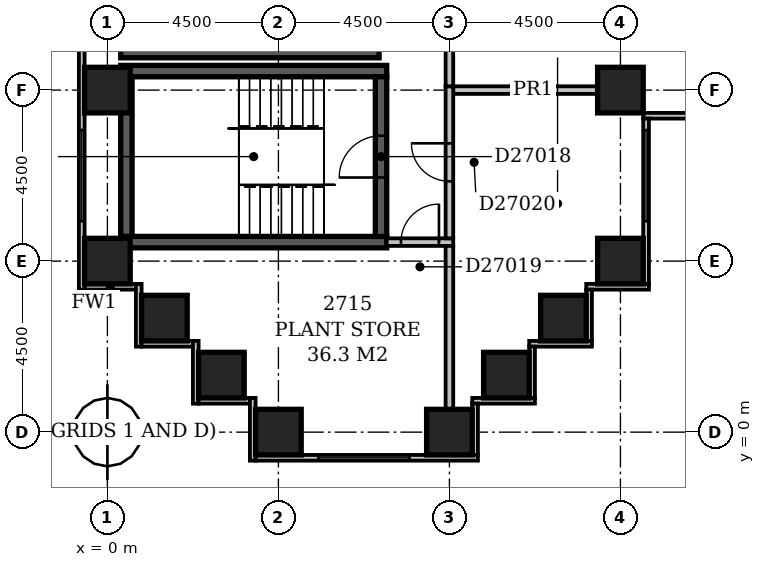
"""IFC4 building model, lengths in metres.
Left out: names, types, materials, properties, quantities, classifications, styles, units other than length and angle.
Written with IfcOpenShell. Run it as: python <this file> out.ifc"""

import sys

from ifc_helpers import new_model, si_unit, direction, frame, frame_2d, origin, origin_2d, place, context, subcontext, project, spatial, rectangle, extrude, element, fill, save


model = new_model("IFC4")
c1 = context("Model", 3, precision=1e-05, world=origin(), true_north=direction((0.0, 1.0)))
c2 = subcontext(c1, "Body", "Model", "MODEL_VIEW")
j1 = project(units=[si_unit("LENGTHUNIT", "METRE"), si_unit("PLANEANGLEUNIT", "RADIAN")], contexts=[c1])
p1 = place(None, origin())
s1 = spatial("IfcSite", under=j1, at=p1, CompositionType="ELEMENT")
p2 = place(p1, origin())
s2 = spatial("IfcBuilding", under=s1, at=p2, CompositionType="ELEMENT")
p3 = place(p2, frame((0.0, 0.0, 108.2)))
s3 = spatial("IfcBuildingStorey", under=s2, at=p3, CompositionType="ELEMENT", Elevation=108.2)
for number, where, z_axis, x_axis in (
    (1, (0.35, 5.0, -0.45), (0.0, 0.0, 1.0), (1.0, 0.0, 0.0)),
    (2, (0.35, 9.5, -0.45), (0.0, 0.0, 1.0), (1.0, 0.0, 0.0)),
):
    element("IfcWall", number, at=place(p3, frame(where, z_axis=z_axis, x_axis=x_axis)), inside=s3, PredefinedType="SHEAR", context=c2, shape_type="SweptSolid", body=[
        extrude(rectangle(XDim=7.0, YDim=0.3, at=frame_2d((3.5, 0.0))), origin(), (0.0, 0.0, 1.0), 5.35),
    ])
p4 = place(p3, frame((0.35, 10.0, -0.45), z_axis=(0.0, 0.0, 1.0), x_axis=(1.0, 0.0, 0.0)))
e3 = element("IfcWall", 3, at=p4, inside=s3, PredefinedType="SHEAR", context=c2, shape_type="SweptSolid", body=[
    extrude(rectangle(XDim=6.8, YDim=0.3, at=frame_2d((3.4, 0.0))), origin(), (0.0, 0.0, 1.0), 5.35),
])
p5 = place(p3, frame((0.5, 5.15, -0.45), z_axis=(0.0, 0.0, 1.0), x_axis=(0.0, 1.0, 0.0)))
e4 = element("IfcWall", 4, at=p5, inside=s3, PredefinedType="SHEAR", context=c2, shape_type="SweptSolid", body=[
    extrude(rectangle(XDim=4.2, YDim=0.3, at=frame_2d((2.1, 0.0))), origin(), (0.0, 0.0, 1.0), 5.35),
])
p6 = place(p3, frame((7.2, 5.15, -0.45), z_axis=(0.0, 0.0, 1.0), x_axis=(0.0, 1.0, 0.0)))
e5 = element("IfcWall", 5, at=p6, inside=s3, PredefinedType="SHEAR", context=c2, shape_type="SweptSolid", body=[
    extrude(rectangle(XDim=4.2, YDim=0.3, at=frame_2d((2.1, 0.0))), origin(), (0.0, 0.0, 1.0), 5.35),
])
p7 = place(p6, frame((1.55, 0.0, 0.45)))
e6 = element("IfcOpeningElement", 6, at=p7, cuts=e5, PredefinedType="OPENING", context=c2, shape_type="SweptSolid", body=[
    extrude(rectangle(XDim=1.1, YDim=2.1, at=frame_2d((0.55, 1.05))), frame((0.0, 0.162, 0.0), z_axis=(0.0, -1.0, 0.0), x_axis=(1.0, 0.0, 0.0)), (0.0, 0.0, 1.0), 0.324),
])
for number, where, z_axis, x_axis in (
    (7, (4.5, 0.0, -0.45), (0.0, 0.0, 1.0), (1.0, 0.0, 0.0)),
    (8, (9.0, 0.0, -0.45), (0.0, 0.0, 1.0), (1.0, 0.0, 0.0)),
    (9, (3.0, 1.5, -0.45), (0.0, 0.0, 1.0), (1.0, 0.0, 0.0)),
    (10, (10.5, 1.5, -0.45), (0.0, 0.0, 1.0), (1.0, 0.0, 0.0)),
    (11, (1.5, 3.0, -0.45), (0.0, 0.0, 1.0), (1.0, 0.0, 0.0)),
    (12, (12.0, 3.0, -0.45), (0.0, 0.0, 1.0), (1.0, 0.0, 0.0)),
    (13, (0.0, 4.5, -0.45), (0.0, 0.0, 1.0), (1.0, 0.0, 0.0)),
    (14, (13.5, 4.5, -0.45), (0.0, 0.0, 1.0), (1.0, 0.0, 0.0)),
    (15, (0.0, 9.0, -0.45), (0.0, 0.0, 1.0), (1.0, 0.0, 0.0)),
    (16, (13.5, 9.0, -0.45), (0.0, 0.0, 1.0), (1.0, 0.0, 0.0)),
):
    element("IfcColumn", number, at=place(p3, frame(where, z_axis=z_axis, x_axis=x_axis)), inside=s3, PredefinedType="COLUMN", context=c2, shape_type="SweptSolid", body=[
        extrude(rectangle(XDim=1.2, YDim=1.2, at=origin_2d()), origin(), (0.0, 0.0, 1.0), 5.35),
    ])
p8 = place(p3, frame((9.675, -0.6, 0.0), z_axis=(0.0, 0.0, 1.0), x_axis=(0.0, 1.0, 0.0)))
e17 = element("IfcWall", 17, at=p8, inside=s3, PredefinedType="STANDARD", context=c2, shape_type="SweptSolid", body=[
    extrude(rectangle(XDim=1.35, YDim=0.15, at=frame_2d((0.675, 0.0))), origin(), (0.0, 0.0, 1.0), 4.3),
])
p9 = place(p3, frame((9.6, 0.825, 0.0), z_axis=(0.0, 0.0, 1.0), x_axis=(1.0, 0.0, 0.0)))
e18 = element("IfcWall", 18, at=p9, inside=s3, PredefinedType="STANDARD", context=c2, shape_type="SweptSolid", body=[
    extrude(rectangle(XDim=1.65, YDim=0.15, at=frame_2d((0.825, 0.0))), origin(), (0.0, 0.0, 1.0), 4.3),
])
p10 = place(p3, frame((11.175, 0.9, 0.0), z_axis=(0.0, 0.0, 1.0), x_axis=(0.0, 1.0, 0.0)))
e19 = element("IfcWall", 19, at=p10, inside=s3, PredefinedType="STANDARD", context=c2, shape_type="SweptSolid", body=[
    extrude(rectangle(XDim=1.35, YDim=0.15, at=frame_2d((0.675, 0.0))), origin(), (0.0, 0.0, 1.0), 4.3),
])
p11 = place(p3, frame((11.1, 2.325, 0.0), z_axis=(0.0, 0.0, 1.0), x_axis=(1.0, 0.0, 0.0)))
e20 = element("IfcWall", 20, at=p11, inside=s3, PredefinedType="STANDARD", context=c2, shape_type="SweptSolid", body=[
    extrude(rectangle(XDim=1.65, YDim=0.15, at=frame_2d((0.825, 0.0))), origin(), (0.0, 0.0, 1.0), 4.3),
])
p12 = place(p3, frame((12.675, 2.4, 0.0), z_axis=(0.0, 0.0, 1.0), x_axis=(0.0, 1.0, 0.0)))
e21 = element("IfcWall", 21, at=p12, inside=s3, PredefinedType="STANDARD", context=c2, shape_type="SweptSolid", body=[
    extrude(rectangle(XDim=1.35, YDim=0.15, at=frame_2d((0.675, 0.0))), origin(), (0.0, 0.0, 1.0), 4.3),
])
p13 = place(p3, frame((12.6, 3.825, 0.0), z_axis=(0.0, 0.0, 1.0), x_axis=(1.0, 0.0, 0.0)))
e22 = element("IfcWall", 22, at=p13, inside=s3, PredefinedType="STANDARD", context=c2, shape_type="SweptSolid", body=[
    extrude(rectangle(XDim=1.65, YDim=0.15, at=frame_2d((0.825, 0.0))), origin(), (0.0, 0.0, 1.0), 4.3),
])
p14 = place(p3, frame((14.175, 3.9, 0.0), z_axis=(0.0, 0.0, 1.0), x_axis=(0.0, 1.0, 0.0)))
e23 = element("IfcWall", 23, at=p14, inside=s3, PredefinedType="STANDARD", context=c2, shape_type="SweptSolid", body=[
    extrude(rectangle(XDim=4.35, YDim=0.15, at=frame_2d((2.175, 0.0))), origin(), (0.0, 0.0, 1.0), 4.3),
])
p15 = place(p14, frame((1.65, 0.0, 0.6)))
e24 = element("IfcOpeningElement", 24, at=p15, cuts=e23, PredefinedType="OPENING", context=c2, shape_type="SweptSolid", body=[
    extrude(rectangle(XDim=2.4, YDim=2.4, at=frame_2d((1.2, 1.2))), frame((0.0, 0.087, 0.0), z_axis=(0.0, -1.0, 0.0), x_axis=(1.0, 0.0, 0.0)), (0.0, 0.0, 1.0), 0.174),
])
p16 = place(p3, frame((14.1, 8.325, 0.0), z_axis=(0.0, 0.0, 1.0), x_axis=(1.0, 0.0, 0.0)))
e25 = element("IfcWall", 25, at=p16, inside=s3, PredefinedType="STANDARD", context=c2, shape_type="SweptSolid", body=[
    extrude(rectangle(XDim=4.65, YDim=0.15, at=frame_2d((2.325, 0.0))), origin(), (0.0, 0.0, 1.0), 4.3),
])
p17 = place(p3, frame((-0.675, 59.1, 0.0), z_axis=(0.0, 0.0, 1.0), x_axis=(0.0, -1.0, 0.0)))
e26 = element("IfcWall", 26, at=p17, inside=s3, PredefinedType="STANDARD", context=c2, shape_type="SweptSolid", body=[
    extrude(rectangle(XDim=55.35, YDim=0.15, at=frame_2d((27.675, 0.0))), origin(), (0.0, 0.0, 1.0), 4.3),
])
p18 = place(p17, frame((5.95, 0.0, 0.6)))
e27 = element("IfcOpeningElement", 27, at=p18, cuts=e26, PredefinedType="OPENING", context=c2, shape_type="SweptSolid", body=[
    extrude(rectangle(XDim=2.4, YDim=2.4, at=frame_2d((1.2, 1.2))), frame((0.0, 0.087, 0.0), z_axis=(0.0, -1.0, 0.0), x_axis=(1.0, 0.0, 0.0)), (0.0, 0.0, 1.0), 0.174),
])
p19 = place(p17, frame((15.15, 0.0, 0.6)))
e28 = element("IfcOpeningElement", 28, at=p19, cuts=e26, PredefinedType="OPENING", context=c2, shape_type="SweptSolid", body=[
    extrude(rectangle(XDim=2.4, YDim=2.4, at=frame_2d((1.2, 1.2))), frame((0.0, 0.087, 0.0), z_axis=(0.0, -1.0, 0.0), x_axis=(1.0, 0.0, 0.0)), (0.0, 0.0, 1.0), 0.174),
])
p20 = place(p17, frame((24.15, 0.0, 0.6)))
e29 = element("IfcOpeningElement", 29, at=p20, cuts=e26, PredefinedType="OPENING", context=c2, shape_type="SweptSolid", body=[
    extrude(rectangle(XDim=2.4, YDim=2.4, at=frame_2d((1.2, 1.2))), frame((0.0, 0.087, 0.0), z_axis=(0.0, -1.0, 0.0), x_axis=(1.0, 0.0, 0.0)), (0.0, 0.0, 1.0), 0.174),
])
p21 = place(p17, frame((32.95, 0.0, 0.6)))
e30 = element("IfcOpeningElement", 30, at=p21, cuts=e26, PredefinedType="OPENING", context=c2, shape_type="SweptSolid", body=[
    extrude(rectangle(XDim=2.4, YDim=2.4, at=frame_2d((1.2, 1.2))), frame((0.0, 0.087, 0.0), z_axis=(0.0, -1.0, 0.0), x_axis=(1.0, 0.0, 0.0)), (0.0, 0.0, 1.0), 0.174),
])
p22 = place(p17, frame((42.15, 0.0, 0.6)))
e31 = element("IfcOpeningElement", 31, at=p22, cuts=e26, PredefinedType="OPENING", context=c2, shape_type="SweptSolid", body=[
    extrude(rectangle(XDim=2.4, YDim=2.4, at=frame_2d((1.2, 1.2))), frame((0.0, 0.087, 0.0), z_axis=(0.0, -1.0, 0.0), x_axis=(1.0, 0.0, 0.0)), (0.0, 0.0, 1.0), 0.174),
])
p23 = place(p17, frame((51.15, 0.0, 0.6)))
e32 = element("IfcOpeningElement", 32, at=p23, cuts=e26, PredefinedType="OPENING", context=c2, shape_type="SweptSolid", body=[
    extrude(rectangle(XDim=2.4, YDim=2.4, at=frame_2d((1.2, 1.2))), frame((0.0, 0.087, 0.0), z_axis=(0.0, -1.0, 0.0), x_axis=(1.0, 0.0, 0.0)), (0.0, 0.0, 1.0), 0.174),
])
p24 = place(p3, frame((-0.6, 3.825, 0.0), z_axis=(0.0, 0.0, 1.0), x_axis=(1.0, 0.0, 0.0)))
e33 = element("IfcWall", 33, at=p24, inside=s3, PredefinedType="STANDARD", context=c2, shape_type="SweptSolid", body=[
    extrude(rectangle(XDim=1.35, YDim=0.15, at=frame_2d((0.675, 0.0))), origin(), (0.0, 0.0, 1.0), 4.3),
])
p25 = place(p3, frame((0.825, 3.9, 0.0), z_axis=(0.0, 0.0, 1.0), x_axis=(0.0, -1.0, 0.0)))
e34 = element("IfcWall", 34, at=p25, inside=s3, PredefinedType="STANDARD", context=c2, shape_type="SweptSolid", body=[
    extrude(rectangle(XDim=1.65, YDim=0.15, at=frame_2d((0.825, 0.0))), origin(), (0.0, 0.0, 1.0), 4.3),
])
p26 = place(p3, frame((0.9, 2.325, 0.0), z_axis=(0.0, 0.0, 1.0), x_axis=(1.0, 0.0, 0.0)))
e35 = element("IfcWall", 35, at=p26, inside=s3, PredefinedType="STANDARD", context=c2, shape_type="SweptSolid", body=[
    extrude(rectangle(XDim=1.35, YDim=0.15, at=frame_2d((0.675, 0.0))), origin(), (0.0, 0.0, 1.0), 4.3),
])
p27 = place(p3, frame((2.325, 2.4, 0.0), z_axis=(0.0, 0.0, 1.0), x_axis=(0.0, -1.0, 0.0)))
e36 = element("IfcWall", 36, at=p27, inside=s3, PredefinedType="STANDARD", context=c2, shape_type="SweptSolid", body=[
    extrude(rectangle(XDim=1.65, YDim=0.15, at=frame_2d((0.825, 0.0))), origin(), (0.0, 0.0, 1.0), 4.3),
])
p28 = place(p3, frame((2.4, 0.825, 0.0), z_axis=(0.0, 0.0, 1.0), x_axis=(1.0, 0.0, 0.0)))
e37 = element("IfcWall", 37, at=p28, inside=s3, PredefinedType="STANDARD", context=c2, shape_type="SweptSolid", body=[
    extrude(rectangle(XDim=1.35, YDim=0.15, at=frame_2d((0.675, 0.0))), origin(), (0.0, 0.0, 1.0), 4.3),
])
p29 = place(p3, frame((3.825, 0.9, 0.0), z_axis=(0.0, 0.0, 1.0), x_axis=(0.0, -1.0, 0.0)))
e38 = element("IfcWall", 38, at=p29, inside=s3, PredefinedType="STANDARD", context=c2, shape_type="SweptSolid", body=[
    extrude(rectangle(XDim=1.65, YDim=0.15, at=frame_2d((0.825, 0.0))), origin(), (0.0, 0.0, 1.0), 4.3),
])
p30 = place(p3, frame((3.9, -0.675, 0.0), z_axis=(0.0, 0.0, 1.0), x_axis=(1.0, 0.0, 0.0)))
e39 = element("IfcWall", 39, at=p30, inside=s3, PredefinedType="STANDARD", context=c2, shape_type="SweptSolid", body=[
    extrude(rectangle(XDim=5.85, YDim=0.15, at=frame_2d((2.925, 0.0))), origin(), (0.0, 0.0, 1.0), 4.3),
])
p31 = place(p30, frame((1.65, 0.0, 0.6)))
e40 = element("IfcOpeningElement", 40, at=p31, cuts=e39, PredefinedType="OPENING", context=c2, shape_type="SweptSolid", body=[
    extrude(rectangle(XDim=2.4, YDim=2.4, at=frame_2d((1.2, 1.2))), frame((0.0, 0.087, 0.0), z_axis=(0.0, -1.0, 0.0), x_axis=(1.0, 0.0, 0.0)), (0.0, 0.0, 1.0), 0.174),
])
p32 = place(p3, frame((9.0, 0.271, 0.0), z_axis=(0.0, 0.0, 1.0), x_axis=(0.0, 1.0, 0.0)))
e41 = element("IfcWall", 41, at=p32, inside=s3, PredefinedType="PARTITIONING", context=c2, shape_type="SweptSolid", body=[
    extrude(rectangle(XDim=4.629, YDim=0.2, at=frame_2d((2.314, 0.0))), origin(), (0.0, 0.0, 1.0), 4.9),
])
p33 = place(p3, frame((7.35, 5.0, 0.0), z_axis=(0.0, 0.0, 1.0), x_axis=(1.0, 0.0, 0.0)))
e42 = element("IfcWall", 42, at=p33, inside=s3, PredefinedType="PARTITIONING", context=c2, shape_type="SweptSolid", body=[
    extrude(rectangle(XDim=1.75, YDim=0.2, at=frame_2d((0.875, 0.0))), origin(), (0.0, 0.0, 1.0), 4.9),
])
p34 = place(p33, frame((0.375, 0.0, 0.0)))
e43 = element("IfcOpeningElement", 43, at=p34, cuts=e42, PredefinedType="OPENING", context=c2, shape_type="SweptSolid", body=[
    extrude(rectangle(XDim=1.0, YDim=2.1, at=frame_2d((0.5, 1.05))), frame((0.0, 0.112, 0.0), z_axis=(0.0, -1.0, 0.0), x_axis=(1.0, 0.0, 0.0)), (0.0, 0.0, 1.0), 0.224),
])
p35 = place(p3, frame((9.0, 5.1, 0.0), z_axis=(0.0, 0.0, 1.0), x_axis=(0.0, 1.0, 0.0)))
e44 = element("IfcWall", 44, at=p35, inside=s3, PredefinedType="PARTITIONING", context=c2, shape_type="SweptSolid", body=[
    extrude(rectangle(XDim=4.0, YDim=0.2, at=frame_2d((2.0, 0.0))), origin(), (0.0, 0.0, 1.0), 4.9),
])
p36 = place(p35, frame((1.5, 0.0, 0.0)))
e45 = element("IfcOpeningElement", 45, at=p36, cuts=e44, PredefinedType="OPENING", context=c2, shape_type="SweptSolid", body=[
    extrude(rectangle(XDim=1.0, YDim=2.1, at=frame_2d((0.5, 1.05))), frame((0.0, 0.112, 0.0), z_axis=(0.0, -1.0, 0.0), x_axis=(1.0, 0.0, 0.0)), (0.0, 0.0, 1.0), 0.224),
])
p37 = place(p3, frame((9.0, 9.1, 0.0), z_axis=(0.0, 0.0, 1.0), x_axis=(0.0, 1.0, 0.0)))
e46 = element("IfcWall", 46, at=p37, inside=s3, PredefinedType="PARTITIONING", context=c2, shape_type="SweptSolid", body=[
    extrude(rectangle(XDim=8.8, YDim=0.2, at=frame_2d((4.4, 0.0))), origin(), (0.0, 0.0, 1.0), 4.9),
])
p38 = place(p37, frame((3.8, 0.0, 0.0)))
e47 = element("IfcOpeningElement", 47, at=p38, cuts=e46, PredefinedType="OPENING", context=c2, shape_type="SweptSolid", body=[
    extrude(rectangle(XDim=1.2, YDim=2.1, at=frame_2d((0.6, 1.05))), frame((0.0, 0.112, 0.0), z_axis=(0.0, -1.0, 0.0), x_axis=(1.0, 0.0, 0.0)), (0.0, 0.0, 1.0), 0.224),
])
p39 = place(p3, frame((13.309, 9.0, 0.0), z_axis=(0.0, 0.0, 1.0), x_axis=(-1.0, 0.0, 0.0)))
e48 = element("IfcWall", 48, at=p39, inside=s3, PredefinedType="PARTITIONING", context=c2, shape_type="SweptSolid", body=[
    extrude(rectangle(XDim=4.208, YDim=0.2, at=frame_2d((2.104, 0.0))), origin(), (0.0, 0.0, 1.0), 4.9),
])
p40 = place(p15, origin())
e49 = element("IfcWindow", 49, at=p40, inside=s3, PartitioningType="SINGLE_PANEL", PredefinedType="USERDEFINED", context=c2, shape_type="SweptSolid", body=[
    extrude(rectangle(XDim=2.4, YDim=2.4, at=frame_2d((1.2, 1.2))), frame((0.0, 0.03, 0.0), z_axis=(0.0, -1.0, 0.0), x_axis=(1.0, 0.0, 0.0)), (0.0, 0.0, 1.0), 0.06),
])
fill(e24, e49)
p41 = place(p23, origin())
e50 = element("IfcWindow", 50, at=p41, inside=s3, PartitioningType="SINGLE_PANEL", PredefinedType="USERDEFINED", context=c2, shape_type="SweptSolid", body=[
    extrude(rectangle(XDim=2.4, YDim=2.4, at=frame_2d((1.2, 1.2))), frame((0.0, 0.03, 0.0), z_axis=(0.0, -1.0, 0.0), x_axis=(1.0, 0.0, 0.0)), (0.0, 0.0, 1.0), 0.06),
])
fill(e32, e50)
p42 = place(p31, origin())
e51 = element("IfcWindow", 51, at=p42, inside=s3, PartitioningType="SINGLE_PANEL", PredefinedType="USERDEFINED", context=c2, shape_type="SweptSolid", body=[
    extrude(rectangle(XDim=2.4, YDim=2.4, at=frame_2d((1.2, 1.2))), frame((0.0, 0.03, 0.0), z_axis=(0.0, -1.0, 0.0), x_axis=(1.0, 0.0, 0.0)), (0.0, 0.0, 1.0), 0.06),
])
fill(e40, e51)
p43 = place(p7, origin())
e52 = element("IfcDoor", 52, at=p43, inside=s3, OperationType="SINGLE_SWING_LEFT", PredefinedType="DOOR", context=c2, shape_type="SweptSolid", body=[
    extrude(rectangle(XDim=1.1, YDim=2.1, at=frame_2d((0.55, 1.05))), frame((0.0, 0.025, 0.0), z_axis=(0.0, -1.0, 0.0), x_axis=(1.0, 0.0, 0.0)), (0.0, 0.0, 1.0), 0.05),
])
fill(e6, e52)
p44 = place(p34, frame((1.0, 0.0, 0.0), z_axis=(0.0, 0.0, 1.0), x_axis=(-1.0, 0.0, 0.0)))
e53 = element("IfcDoor", 53, at=p44, inside=s3, OperationType="SINGLE_SWING_LEFT", PredefinedType="DOOR", context=c2, shape_type="SweptSolid", body=[
    extrude(rectangle(XDim=1.0, YDim=2.1, at=frame_2d((0.5, 1.05))), frame((0.0, 0.025, 0.0), z_axis=(0.0, -1.0, 0.0), x_axis=(1.0, 0.0, 0.0)), (0.0, 0.0, 1.0), 0.05),
])
fill(e43, e53)
p45 = place(p36, frame((1.0, 0.0, 0.0), z_axis=(0.0, 0.0, 1.0), x_axis=(-1.0, 0.0, 0.0)))
e54 = element("IfcDoor", 54, at=p45, inside=s3, OperationType="SINGLE_SWING_LEFT", PredefinedType="DOOR", context=c2, shape_type="SweptSolid", body=[
    extrude(rectangle(XDim=1.0, YDim=2.1, at=frame_2d((0.5, 1.05))), frame((0.0, 0.025, 0.0), z_axis=(0.0, -1.0, 0.0), x_axis=(1.0, 0.0, 0.0)), (0.0, 0.0, 1.0), 0.05),
])
fill(e45, e54)
save(model, sys.argv[1])
